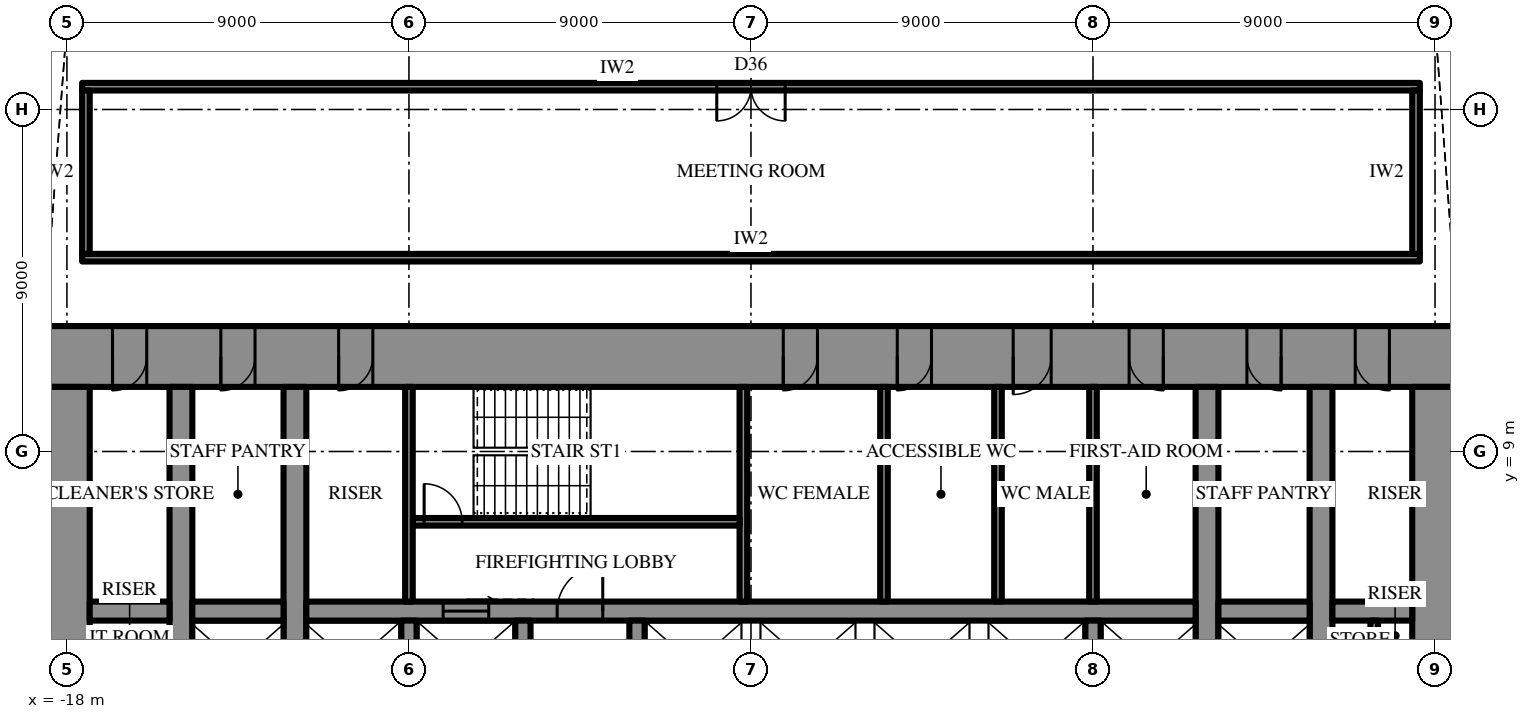
"""IFC4 building model, lengths in metres.
Left out: names, types, materials, properties, quantities, classifications, styles, units other than length and angle.
Written with IfcOpenShell. Run it as: python <this file> out.ifc"""

import sys

from ifc_helpers import new_model, si_unit, direction, frame, frame_2d, origin, place, context, subcontext, project, spatial, rectangle, extrude, element, fill, save


model = new_model("IFC4")
c1 = context("Model", 3, precision=1e-05, world=origin(), true_north=direction((0.0, 1.0)))
c2 = subcontext(c1, "Body", "Model", "MODEL_VIEW")
j1 = project(units=[si_unit("LENGTHUNIT", "METRE"), si_unit("PLANEANGLEUNIT", "RADIAN")], contexts=[c1])
p1 = place(None, origin())
s1 = spatial("IfcSite", under=j1, at=p1, CompositionType="ELEMENT")
p2 = place(p1, origin())
s2 = spatial("IfcBuilding", under=s1, at=p2, CompositionType="ELEMENT")
p3 = place(p2, frame((0.0, 0.0, 174.1)))
s3 = spatial("IfcBuildingStorey", under=s2, at=p3, CompositionType="ELEMENT", Elevation=174.1)
p4 = place(p3, frame((-18.6, 11.5, 0.0), z_axis=(0.0, 0.0, 1.0), x_axis=(1.0, 0.0, 0.0)))
e1 = element("IfcWall", 1, at=p4, inside=s3, PredefinedType="SHEAR", context=c2, shape_type="SweptSolid", body=[
    extrude(rectangle(XDim=37.2, YDim=1.6, at=frame_2d((18.6, 0.0))), origin(), (0.0, 0.0, 1.0), 4.2),
])
p5 = place(p4, frame((19.45, 0.0, 0.0)))
e2 = element("IfcOpeningElement", 2, at=p5, cuts=e1, PredefinedType="OPENING", context=c2, shape_type="SweptSolid", body=[
    extrude(rectangle(XDim=0.9, YDim=2.2, at=frame_2d((0.45, 1.1))), frame((0.0, 0.81, 0.0), z_axis=(0.0, -1.0, 0.0), x_axis=(1.0, 0.0, 0.0)), (0.0, 0.0, 1.0), 1.62),
])
p6 = place(p4, frame((22.45, 0.0, 0.0)))
e3 = element("IfcOpeningElement", 3, at=p6, cuts=e1, PredefinedType="OPENING", context=c2, shape_type="SweptSolid", body=[
    extrude(rectangle(XDim=0.9, YDim=2.2, at=frame_2d((0.45, 1.1))), frame((0.0, 0.81, 0.0), z_axis=(0.0, -1.0, 0.0), x_axis=(1.0, 0.0, 0.0)), (0.0, 0.0, 1.0), 1.62),
])
p7 = place(p4, frame((25.5, 0.0, 0.0)))
e4 = element("IfcOpeningElement", 4, at=p7, cuts=e1, PredefinedType="OPENING", context=c2, shape_type="SweptSolid", body=[
    extrude(rectangle(XDim=1.0, YDim=2.2, at=frame_2d((0.5, 1.1))), frame((0.0, 0.81, 0.0), z_axis=(0.0, -1.0, 0.0), x_axis=(1.0, 0.0, 0.0)), (0.0, 0.0, 1.0), 1.62),
])
p8 = place(p4, frame((1.8, 0.0, 0.0)))
e5 = element("IfcOpeningElement", 5, at=p8, cuts=e1, PredefinedType="OPENING", context=c2, shape_type="SweptSolid", body=[
    extrude(rectangle(XDim=0.9, YDim=2.2, at=frame_2d((0.45, 1.1))), frame((0.0, 0.81, 0.0), z_axis=(0.0, -1.0, 0.0), x_axis=(1.0, 0.0, 0.0)), (0.0, 0.0, 1.0), 1.62),
])
p9 = place(p4, frame((4.65, 0.0, 0.0)))
e6 = element("IfcOpeningElement", 6, at=p9, cuts=e1, PredefinedType="OPENING", context=c2, shape_type="SweptSolid", body=[
    extrude(rectangle(XDim=0.9, YDim=2.2, at=frame_2d((0.45, 1.1))), frame((0.0, 0.81, 0.0), z_axis=(0.0, -1.0, 0.0), x_axis=(1.0, 0.0, 0.0)), (0.0, 0.0, 1.0), 1.62),
])
p10 = place(p4, frame((7.75, 0.0, 0.0)))
e7 = element("IfcOpeningElement", 7, at=p10, cuts=e1, PredefinedType="OPENING", context=c2, shape_type="SweptSolid", body=[
    extrude(rectangle(XDim=0.9, YDim=2.2, at=frame_2d((0.45, 1.1))), frame((0.0, 0.81, 0.0), z_axis=(0.0, -1.0, 0.0), x_axis=(1.0, 0.0, 0.0)), (0.0, 0.0, 1.0), 1.62),
])
p11 = place(p4, frame((28.55, 0.0, 0.0)))
e8 = element("IfcOpeningElement", 8, at=p11, cuts=e1, PredefinedType="OPENING", context=c2, shape_type="SweptSolid", body=[
    extrude(rectangle(XDim=0.9, YDim=2.2, at=frame_2d((0.45, 1.1))), frame((0.0, 0.81, 0.0), z_axis=(0.0, -1.0, 0.0), x_axis=(1.0, 0.0, 0.0)), (0.0, 0.0, 1.0), 1.62),
])
p12 = place(p4, frame((31.65, 0.0, 0.0)))
e9 = element("IfcOpeningElement", 9, at=p12, cuts=e1, PredefinedType="OPENING", context=c2, shape_type="SweptSolid", body=[
    extrude(rectangle(XDim=0.9, YDim=2.2, at=frame_2d((0.45, 1.1))), frame((0.0, 0.81, 0.0), z_axis=(0.0, -1.0, 0.0), x_axis=(1.0, 0.0, 0.0)), (0.0, 0.0, 1.0), 1.62),
])
p13 = place(p4, frame((34.5, 0.0, 0.0)))
e10 = element("IfcOpeningElement", 10, at=p13, cuts=e1, PredefinedType="OPENING", context=c2, shape_type="SweptSolid", body=[
    extrude(rectangle(XDim=0.9, YDim=2.2, at=frame_2d((0.45, 1.1))), frame((0.0, 0.81, 0.0), z_axis=(0.0, -1.0, 0.0), x_axis=(1.0, 0.0, 0.0)), (0.0, 0.0, 1.0), 1.62),
])
p14 = place(p3, frame((18.0, -10.7, 0.0), z_axis=(0.0, 0.0, 1.0), x_axis=(0.0, 1.0, 0.0)))
e11 = element("IfcWall", 11, at=p14, inside=s3, PredefinedType="SHEAR", context=c2, shape_type="SweptSolid", body=[
    extrude(rectangle(XDim=21.4, YDim=1.2, at=frame_2d((10.7, 0.0))), origin(), (0.0, 0.0, 1.0), 4.2),
])
p15 = place(p14, frame((9.8, 0.0, 0.0)))
e12 = element("IfcOpeningElement", 12, at=p15, cuts=e11, PredefinedType="OPENING", context=c2, shape_type="SweptSolid", body=[
    extrude(rectangle(XDim=1.8, YDim=2.4, at=frame_2d((0.9, 1.2))), frame((0.0, 0.61, 0.0), z_axis=(0.0, -1.0, 0.0), x_axis=(1.0, 0.0, 0.0)), (0.0, 0.0, 1.0), 1.22),
])
p16 = place(p3, frame((-18.0, 10.7, 0.0), z_axis=(0.0, 0.0, 1.0), x_axis=(0.0, -1.0, 0.0)))
e13 = element("IfcWall", 13, at=p16, inside=s3, PredefinedType="SHEAR", context=c2, shape_type="SweptSolid", body=[
    extrude(rectangle(XDim=21.4, YDim=1.2, at=frame_2d((10.7, 0.0))), origin(), (0.0, 0.0, 1.0), 4.2),
])
p17 = place(p16, frame((9.8, 0.0, 0.0)))
e14 = element("IfcOpeningElement", 14, at=p17, cuts=e13, PredefinedType="OPENING", context=c2, shape_type="SweptSolid", body=[
    extrude(rectangle(XDim=1.8, YDim=2.4, at=frame_2d((0.9, 1.2))), frame((0.0, 0.61, 0.0), z_axis=(0.0, -1.0, 0.0), x_axis=(1.0, 0.0, 0.0)), (0.0, 0.0, 1.0), 1.22),
])
p18 = place(p3, frame((12.0, -10.7, 0.0), z_axis=(0.0, 0.0, 1.0), x_axis=(0.0, 1.0, 0.0)))
e15 = element("IfcWall", 15, at=p18, inside=s3, PredefinedType="SHEAR", context=c2, shape_type="SweptSolid", body=[
    extrude(rectangle(XDim=21.4, YDim=0.6, at=frame_2d((10.7, 0.0))), origin(), (0.0, 0.0, 1.0), 4.2),
])
p19 = place(p18, frame((9.8, 0.0, 0.0)))
e16 = element("IfcOpeningElement", 16, at=p19, cuts=e15, PredefinedType="OPENING", context=c2, shape_type="SweptSolid", body=[
    extrude(rectangle(XDim=1.8, YDim=2.4, at=frame_2d((0.9, 1.2))), frame((0.0, 0.31, 0.0), z_axis=(0.0, -1.0, 0.0), x_axis=(1.0, 0.0, 0.0)), (0.0, 0.0, 1.0), 0.62),
])
p20 = place(p3, frame((-12.0, -10.7, 0.0), z_axis=(0.0, 0.0, 1.0), x_axis=(0.0, 1.0, 0.0)))
e17 = element("IfcWall", 17, at=p20, inside=s3, PredefinedType="SHEAR", context=c2, shape_type="SweptSolid", body=[
    extrude(rectangle(XDim=21.4, YDim=0.6, at=frame_2d((10.7, 0.0))), origin(), (0.0, 0.0, 1.0), 4.2),
])
p21 = place(p20, frame((9.8, 0.0, 0.0)))
e18 = element("IfcOpeningElement", 18, at=p21, cuts=e17, PredefinedType="OPENING", context=c2, shape_type="SweptSolid", body=[
    extrude(rectangle(XDim=1.8, YDim=2.4, at=frame_2d((0.9, 1.2))), frame((0.0, 0.31, 0.0), z_axis=(0.0, -1.0, 0.0), x_axis=(1.0, 0.0, 0.0)), (0.0, 0.0, 1.0), 0.62),
])
p22 = place(p3, frame((15.0, -10.7, 0.0), z_axis=(0.0, 0.0, 1.0), x_axis=(0.0, 1.0, 0.0)))
e19 = element("IfcWall", 19, at=p22, inside=s3, PredefinedType="SHEAR", context=c2, shape_type="SweptSolid", body=[
    extrude(rectangle(XDim=21.4, YDim=0.6, at=frame_2d((10.7, 0.0))), origin(), (0.0, 0.0, 1.0), 4.2),
])
p23 = place(p22, frame((9.8, 0.0, 0.0)))
e20 = element("IfcOpeningElement", 20, at=p23, cuts=e19, PredefinedType="OPENING", context=c2, shape_type="SweptSolid", body=[
    extrude(rectangle(XDim=1.8, YDim=2.4, at=frame_2d((0.9, 1.2))), frame((0.0, 0.31, 0.0), z_axis=(0.0, -1.0, 0.0), x_axis=(1.0, 0.0, 0.0)), (0.0, 0.0, 1.0), 0.62),
])
p24 = place(p3, frame((-15.0, -10.7, 0.0), z_axis=(0.0, 0.0, 1.0), x_axis=(0.0, 1.0, 0.0)))
e21 = element("IfcWall", 21, at=p24, inside=s3, PredefinedType="SHEAR", context=c2, shape_type="SweptSolid", body=[
    extrude(rectangle(XDim=21.4, YDim=0.6, at=frame_2d((10.7, 0.0))), origin(), (0.0, 0.0, 1.0), 4.2),
])
p25 = place(p24, frame((9.8, 0.0, 0.0)))
e22 = element("IfcOpeningElement", 22, at=p25, cuts=e21, PredefinedType="OPENING", context=c2, shape_type="SweptSolid", body=[
    extrude(rectangle(XDim=1.8, YDim=2.4, at=frame_2d((0.9, 1.2))), frame((0.0, 0.31, 0.0), z_axis=(0.0, -1.0, 0.0), x_axis=(1.0, 0.0, 0.0)), (0.0, 0.0, 1.0), 0.62),
])
p26 = place(p3, frame((-17.4, 4.8, 0.0), z_axis=(0.0, 0.0, 1.0), x_axis=(1.0, 0.0, 0.0)))
e23 = element("IfcWall", 23, at=p26, inside=s3, PredefinedType="SHEAR", context=c2, shape_type="SweptSolid", body=[
    extrude(rectangle(XDim=2.1, YDim=0.5, at=frame_2d((1.05, 0.0))), origin(), (0.0, 0.0, 1.0), 4.2),
])
p27 = place(p3, frame((-14.7, 4.8, 0.0), z_axis=(0.0, 0.0, 1.0), x_axis=(1.0, 0.0, 0.0)))
e24 = element("IfcWall", 24, at=p27, inside=s3, PredefinedType="SHEAR", context=c2, shape_type="SweptSolid", body=[
    extrude(rectangle(XDim=2.4, YDim=0.5, at=frame_2d((1.2, 0.0))), origin(), (0.0, 0.0, 1.0), 4.2),
])
p28 = place(p3, frame((-11.7, 4.8, 0.0), z_axis=(0.0, 0.0, 1.0), x_axis=(1.0, 0.0, 0.0)))
e25 = element("IfcWall", 25, at=p28, inside=s3, PredefinedType="SHEAR", context=c2, shape_type="SweptSolid", body=[
    extrude(rectangle(XDim=23.4, YDim=0.5, at=frame_2d((11.7, 0.0))), origin(), (0.0, 0.0, 1.0), 4.2),
])
p29 = place(p28, frame((6.6, 0.0, 0.0)))
e26 = element("IfcOpeningElement", 26, at=p29, cuts=e25, PredefinedType="OPENING", context=c2, shape_type="SweptSolid", body=[
    extrude(rectangle(XDim=1.2, YDim=2.2, at=frame_2d((0.6, 1.1))), frame((0.0, 0.26, 0.0), z_axis=(0.0, -1.0, 0.0), x_axis=(1.0, 0.0, 0.0)), (0.0, 0.0, 1.0), 0.52),
])
p30 = place(p28, frame((3.6, 0.0, 0.0)))
e27 = element("IfcOpeningElement", 27, at=p30, cuts=e25, PredefinedType="OPENING", context=c2, shape_type="SweptSolid", body=[
    extrude(rectangle(XDim=1.2, YDim=2.2, at=frame_2d((0.6, 1.1))), frame((0.0, 0.26, 0.0), z_axis=(0.0, -1.0, 0.0), x_axis=(1.0, 0.0, 0.0)), (0.0, 0.0, 1.0), 0.52),
])
p31 = place(p3, frame((12.3, 4.8, 0.0), z_axis=(0.0, 0.0, 1.0), x_axis=(1.0, 0.0, 0.0)))
e28 = element("IfcWall", 28, at=p31, inside=s3, PredefinedType="SHEAR", context=c2, shape_type="SweptSolid", body=[
    extrude(rectangle(XDim=2.4, YDim=0.5, at=frame_2d((1.2, 0.0))), origin(), (0.0, 0.0, 1.0), 4.2),
])
p32 = place(p3, frame((15.3, 4.8, 0.0), z_axis=(0.0, 0.0, 1.0), x_axis=(1.0, 0.0, 0.0)))
e29 = element("IfcWall", 29, at=p32, inside=s3, PredefinedType="SHEAR", context=c2, shape_type="SweptSolid", body=[
    extrude(rectangle(XDim=2.1, YDim=0.5, at=frame_2d((1.05, 0.0))), origin(), (0.0, 0.0, 1.0), 4.2),
])
for number, where, z_axis, x_axis in (
    (30, (-9.0, 2.25, 0.0), (0.0, 0.0, 1.0), (0.0, 1.0, 0.0)),
    (31, (-6.0, 2.25, 0.0), (0.0, 0.0, 1.0), (0.0, 1.0, 0.0)),
    (32, (-3.0, 2.25, 0.0), (0.0, 0.0, 1.0), (0.0, 1.0, 0.0)),
    (33, (9.0, 2.25, 0.0), (0.0, 0.0, 1.0), (0.0, 1.0, 0.0)),
):
    element("IfcWall", number, at=place(p3, frame(where, z_axis=z_axis, x_axis=x_axis)), inside=s3, PredefinedType="SHEAR", context=c2, shape_type="SweptSolid", body=[
        extrude(rectangle(XDim=2.3, YDim=0.4, at=frame_2d((1.15, 0.0))), origin(), (0.0, 0.0, 1.0), 4.2),
    ])
p33 = place(p3, frame((-0.2, 5.05, 0.0), z_axis=(0.0, 0.0, 1.0), x_axis=(0.0, 1.0, 0.0)))
e34 = element("IfcWall", 34, at=p33, inside=s3, PredefinedType="SHEAR", context=c2, shape_type="SweptSolid", body=[
    extrude(rectangle(XDim=5.65, YDim=0.2, at=frame_2d((2.825, 0.0))), origin(), (0.0, 0.0, 1.0), 4.2),
])
p34 = place(p3, frame((-8.9, 7.15, 0.0), z_axis=(0.0, 0.0, 1.0), x_axis=(1.0, 0.0, 0.0)))
e35 = element("IfcWall", 35, at=p34, inside=s3, PredefinedType="SHEAR", context=c2, shape_type="SweptSolid", body=[
    extrude(rectangle(XDim=8.6, YDim=0.2, at=frame_2d((4.3, 0.0))), origin(), (0.0, 0.0, 1.0), 4.2),
])
p35 = place(p34, frame((0.3, 0.0, 0.0)))
e36 = element("IfcOpeningElement", 36, at=p35, cuts=e35, PredefinedType="OPENING", context=c2, shape_type="SweptSolid", body=[
    extrude(rectangle(XDim=1.0, YDim=2.2, at=frame_2d((0.5, 1.1))), frame((0.0, 0.11, 0.0), z_axis=(0.0, -1.0, 0.0), x_axis=(1.0, 0.0, 0.0)), (0.0, 0.0, 1.0), 0.22),
])
for number, where, z_axis, x_axis in (
    (37, (-9.0, 5.05, 0.0), (0.0, 0.0, 1.0), (0.0, 1.0, 0.0)),
    (38, (9.0, 5.05, 0.0), (0.0, 0.0, 1.0), (0.0, 1.0, 0.0)),
    (39, (3.5, 5.05, 0.0), (0.0, 0.0, 1.0), (0.0, 1.0, 0.0)),
    (40, (6.5, 5.05, 0.0), (0.0, 0.0, 1.0), (0.0, 1.0, 0.0)),
):
    element("IfcWall", number, at=place(p3, frame(where, z_axis=z_axis, x_axis=x_axis)), inside=s3, PredefinedType="PARTITIONING", context=c2, shape_type="SweptSolid", body=[
        extrude(rectangle(XDim=5.65, YDim=0.2, at=frame_2d((2.825, 0.0))), origin(), (0.0, 0.0, 1.0), 4.0),
    ])
p36 = place(p3, frame((16.4, 3.55, 0.0), z_axis=(0.0, 0.0, 1.0), x_axis=(0.0, 1.0, 0.0)))
e41 = element("IfcWall", 41, at=p36, inside=s3, PredefinedType="PARTITIONING", context=c2, shape_type="SweptSolid", body=[
    extrude(rectangle(XDim=1.0, YDim=0.2, at=frame_2d((0.5, 0.0))), origin(), (0.0, 0.0, 1.0), 4.0),
])
p37 = place(p3, frame((-17.6, 14.1, 0.0), z_axis=(0.0, 0.0, 1.0), x_axis=(1.0, 0.0, 0.0)))
e42 = element("IfcWall", 42, at=p37, inside=s3, PredefinedType="PARTITIONING", context=c2, shape_type="SweptSolid", body=[
    extrude(rectangle(XDim=35.2, YDim=0.2, at=frame_2d((17.6, 0.0))), origin(), (0.0, 0.0, 1.0), 4.0),
])
p38 = place(p3, frame((-17.6, 18.6, 0.0), z_axis=(0.0, 0.0, 1.0), x_axis=(1.0, 0.0, 0.0)))
e43 = element("IfcWall", 43, at=p38, inside=s3, PredefinedType="PARTITIONING", context=c2, shape_type="SweptSolid", body=[
    extrude(rectangle(XDim=35.2, YDim=0.2, at=frame_2d((17.6, 0.0))), origin(), (0.0, 0.0, 1.0), 4.0),
])
p39 = place(p38, frame((16.7, 0.0, 0.0)))
e44 = element("IfcOpeningElement", 44, at=p39, cuts=e43, PredefinedType="OPENING", context=c2, shape_type="SweptSolid", body=[
    extrude(rectangle(XDim=1.8, YDim=2.4, at=frame_2d((0.9, 1.2))), frame((0.0, 0.11, 0.0), z_axis=(0.0, -1.0, 0.0), x_axis=(1.0, 0.0, 0.0)), (0.0, 0.0, 1.0), 0.22),
])
for number, where, z_axis, x_axis in (
    (45, (-17.5, 14.2, 0.0), (0.0, 0.0, 1.0), (0.0, 1.0, 0.0)),
    (46, (17.5, 14.2, 0.0), (0.0, 0.0, 1.0), (0.0, 1.0, 0.0)),
):
    element("IfcWall", number, at=place(p3, frame(where, z_axis=z_axis, x_axis=x_axis)), inside=s3, PredefinedType="PARTITIONING", context=c2, shape_type="SweptSolid", body=[
        extrude(rectangle(XDim=4.3, YDim=0.2, at=frame_2d((2.15, 0.0))), origin(), (0.0, 0.0, 1.0), 4.0),
    ])
p40 = place(p29, origin())
e47 = element("IfcDoor", 47, at=p40, inside=s3, OperationType="SINGLE_SWING_LEFT", PredefinedType="DOOR", context=c2, shape_type="SweptSolid", body=[
    extrude(rectangle(XDim=1.2, YDim=2.2, at=frame_2d((0.6, 1.1))), frame((0.0, 0.025, 0.0), z_axis=(0.0, -1.0, 0.0), x_axis=(1.0, 0.0, 0.0)), (0.0, 0.0, 1.0), 0.05),
])
fill(e26, e47)
p41 = place(p35, origin())
e48 = element("IfcDoor", 48, at=p41, inside=s3, OperationType="SINGLE_SWING_RIGHT", PredefinedType="DOOR", context=c2, shape_type="SweptSolid", body=[
    extrude(rectangle(XDim=1.0, YDim=2.2, at=frame_2d((0.5, 1.1))), frame((0.0, 0.025, 0.0), z_axis=(0.0, -1.0, 0.0), x_axis=(1.0, 0.0, 0.0)), (0.0, 0.0, 1.0), 0.05),
])
fill(e36, e48)
p42 = place(p5, frame((0.9, 0.0, 0.0), z_axis=(0.0, 0.0, 1.0), x_axis=(-1.0, 0.0, 0.0)))
e49 = element("IfcDoor", 49, at=p42, inside=s3, OperationType="SINGLE_SWING_LEFT", PredefinedType="DOOR", context=c2, shape_type="SweptSolid", body=[
    extrude(rectangle(XDim=0.9, YDim=2.2, at=frame_2d((0.45, 1.1))), frame((0.0, 0.025, 0.0), z_axis=(0.0, -1.0, 0.0), x_axis=(1.0, 0.0, 0.0)), (0.0, 0.0, 1.0), 0.05),
])
fill(e2, e49)
p43 = place(p6, frame((0.9, 0.0, 0.0), z_axis=(0.0, 0.0, 1.0), x_axis=(-1.0, 0.0, 0.0)))
e50 = element("IfcDoor", 50, at=p43, inside=s3, OperationType="SINGLE_SWING_LEFT", PredefinedType="DOOR", context=c2, shape_type="SweptSolid", body=[
    extrude(rectangle(XDim=0.9, YDim=2.2, at=frame_2d((0.45, 1.1))), frame((0.0, 0.025, 0.0), z_axis=(0.0, -1.0, 0.0), x_axis=(1.0, 0.0, 0.0)), (0.0, 0.0, 1.0), 0.05),
])
fill(e3, e50)
p44 = place(p7, frame((1.0, 0.0, 0.0), z_axis=(0.0, 0.0, 1.0), x_axis=(-1.0, 0.0, 0.0)))
e51 = element("IfcDoor", 51, at=p44, inside=s3, OperationType="SINGLE_SWING_LEFT", PredefinedType="DOOR", context=c2, shape_type="SweptSolid", body=[
    extrude(rectangle(XDim=1.0, YDim=2.2, at=frame_2d((0.5, 1.1))), frame((0.0, 0.025, 0.0), z_axis=(0.0, -1.0, 0.0), x_axis=(1.0, 0.0, 0.0)), (0.0, 0.0, 1.0), 0.05),
])
fill(e4, e51)
p45 = place(p8, frame((0.9, 0.0, 0.0), z_axis=(0.0, 0.0, 1.0), x_axis=(-1.0, 0.0, 0.0)))
e52 = element("IfcDoor", 52, at=p45, inside=s3, OperationType="SINGLE_SWING_LEFT", PredefinedType="DOOR", context=c2, shape_type="SweptSolid", body=[
    extrude(rectangle(XDim=0.9, YDim=2.2, at=frame_2d((0.45, 1.1))), frame((0.0, 0.025, 0.0), z_axis=(0.0, -1.0, 0.0), x_axis=(1.0, 0.0, 0.0)), (0.0, 0.0, 1.0), 0.05),
])
fill(e5, e52)
p46 = place(p9, frame((0.9, 0.0, 0.0), z_axis=(0.0, 0.0, 1.0), x_axis=(-1.0, 0.0, 0.0)))
e53 = element("IfcDoor", 53, at=p46, inside=s3, OperationType="SINGLE_SWING_LEFT", PredefinedType="DOOR", context=c2, shape_type="SweptSolid", body=[
    extrude(rectangle(XDim=0.9, YDim=2.2, at=frame_2d((0.45, 1.1))), frame((0.0, 0.025, 0.0), z_axis=(0.0, -1.0, 0.0), x_axis=(1.0, 0.0, 0.0)), (0.0, 0.0, 1.0), 0.05),
])
fill(e6, e53)
p47 = place(p10, frame((0.9, 0.0, 0.0), z_axis=(0.0, 0.0, 1.0), x_axis=(-1.0, 0.0, 0.0)))
e54 = element("IfcDoor", 54, at=p47, inside=s3, OperationType="SINGLE_SWING_LEFT", PredefinedType="DOOR", context=c2, shape_type="SweptSolid", body=[
    extrude(rectangle(XDim=0.9, YDim=2.2, at=frame_2d((0.45, 1.1))), frame((0.0, 0.025, 0.0), z_axis=(0.0, -1.0, 0.0), x_axis=(1.0, 0.0, 0.0)), (0.0, 0.0, 1.0), 0.05),
])
fill(e7, e54)
p48 = place(p11, frame((0.9, 0.0, 0.0), z_axis=(0.0, 0.0, 1.0), x_axis=(-1.0, 0.0, 0.0)))
e55 = element("IfcDoor", 55, at=p48, inside=s3, OperationType="SINGLE_SWING_RIGHT", PredefinedType="DOOR", context=c2, shape_type="SweptSolid", body=[
    extrude(rectangle(XDim=0.9, YDim=2.2, at=frame_2d((0.45, 1.1))), frame((0.0, 0.025, 0.0), z_axis=(0.0, -1.0, 0.0), x_axis=(1.0, 0.0, 0.0)), (0.0, 0.0, 1.0), 0.05),
])
fill(e8, e55)
p49 = place(p12, frame((0.9, 0.0, 0.0), z_axis=(0.0, 0.0, 1.0), x_axis=(-1.0, 0.0, 0.0)))
e56 = element("IfcDoor", 56, at=p49, inside=s3, OperationType="SINGLE_SWING_RIGHT", PredefinedType="DOOR", context=c2, shape_type="SweptSolid", body=[
    extrude(rectangle(XDim=0.9, YDim=2.2, at=frame_2d((0.45, 1.1))), frame((0.0, 0.025, 0.0), z_axis=(0.0, -1.0, 0.0), x_axis=(1.0, 0.0, 0.0)), (0.0, 0.0, 1.0), 0.05),
])
fill(e9, e56)
p50 = place(p13, frame((0.9, 0.0, 0.0), z_axis=(0.0, 0.0, 1.0), x_axis=(-1.0, 0.0, 0.0)))
e57 = element("IfcDoor", 57, at=p50, inside=s3, OperationType="SINGLE_SWING_RIGHT", PredefinedType="DOOR", context=c2, shape_type="SweptSolid", body=[
    extrude(rectangle(XDim=0.9, YDim=2.2, at=frame_2d((0.45, 1.1))), frame((0.0, 0.025, 0.0), z_axis=(0.0, -1.0, 0.0), x_axis=(1.0, 0.0, 0.0)), (0.0, 0.0, 1.0), 0.05),
])
fill(e10, e57)
p51 = place(p30, origin())
e58 = element("IfcDoor", 58, at=p51, inside=s3, OperationType="SLIDING_TO_LEFT", PredefinedType="DOOR", context=c2, shape_type="SweptSolid", body=[
    extrude(rectangle(XDim=1.2, YDim=2.2, at=frame_2d((0.6, 1.1))), frame((0.0, 0.025, 0.0), z_axis=(0.0, -1.0, 0.0), x_axis=(1.0, 0.0, 0.0)), (0.0, 0.0, 1.0), 0.05),
])
fill(e27, e58)
p52 = place(p39, frame((1.8, 0.0, 0.0), z_axis=(0.0, 0.0, 1.0), x_axis=(-1.0, 0.0, 0.0)))
e59 = element("IfcDoor", 59, at=p52, inside=s3, OperationType="DOUBLE_DOOR_SINGLE_SWING", PredefinedType="DOOR", context=c2, shape_type="SweptSolid", body=[
    extrude(rectangle(XDim=1.8, YDim=2.4, at=frame_2d((0.9, 1.2))), frame((0.0, 0.025, 0.0), z_axis=(0.0, -1.0, 0.0), x_axis=(1.0, 0.0, 0.0)), (0.0, 0.0, 1.0), 0.05),
])
fill(e44, e59)
save(model, sys.argv[1])
